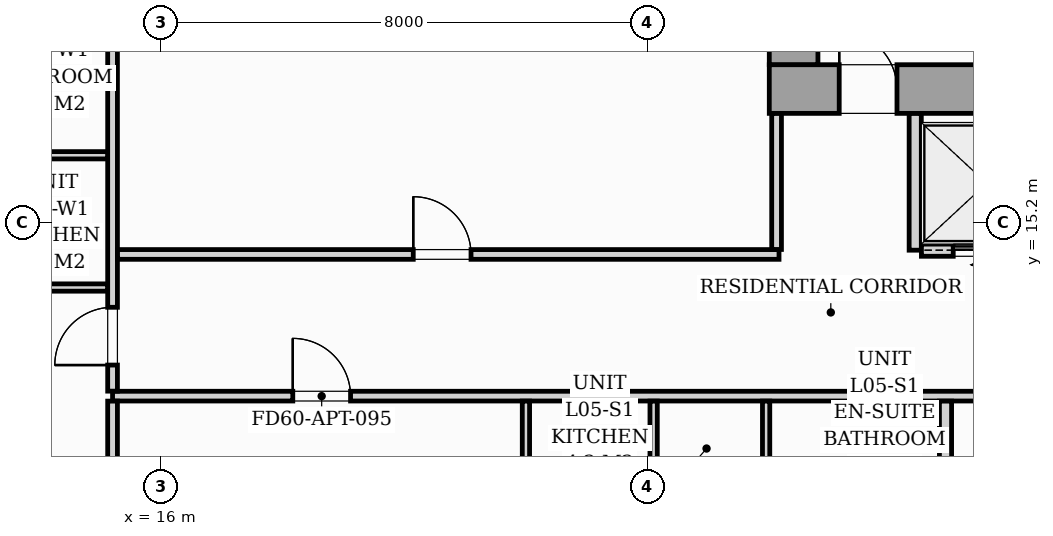
"""IFC4 building model, lengths in metres.
Left out: names, types, materials, properties, quantities, classifications, styles, units other than length and angle.
Written with IfcOpenShell. Run it as: python <this file> out.ifc"""

import sys

from ifc_helpers import new_model, si_unit, direction, frame, frame_2d, origin, origin_2d, place, context, subcontext, project, spatial, rectangle, i_section, extrude, source, transform, mapped, element, fill, save


model = new_model("IFC4")
c1 = context("Model", 3, precision=1e-05, world=origin(), true_north=direction((0.0, 1.0)))
c2 = subcontext(c1, "Body", "Model", "MODEL_VIEW")
j1 = project(units=[si_unit("LENGTHUNIT", "METRE"), si_unit("PLANEANGLEUNIT", "RADIAN")], contexts=[c1])
p1 = place(None, origin())
s1 = spatial("IfcSite", under=j1, at=p1, CompositionType="ELEMENT")
p2 = place(p1, origin())
s2 = spatial("IfcBuilding", under=s1, at=p2, CompositionType="ELEMENT")
p3 = place(p2, frame((0.0, 0.0, 23.0)))
s3 = spatial("IfcBuildingStorey", under=s2, at=p3, CompositionType="ELEMENT", Elevation=23.0)
m1 = source(origin(), c2, "Body", "SweptSolid", [
    extrude(i_section(OverallWidth=0.437, OverallDepth=0.514, WebThickness=0.061, FlangeThickness=0.097, FilletRadius=0.018, at=origin_2d()), origin(), (0.0, 0.0, 1.0), 3.196),
])
p4 = place(p3, frame((26.4, 17.4, 0.002), z_axis=(0.0, 0.0, 1.0), x_axis=(1.0, 0.0, 0.0)))
e1 = element("IfcColumn", 1, at=p4, inside=s3, PredefinedType="PILASTER", context=c2, shape_type="MappedRepresentation", body=[
    mapped(m1, transform((0.0, 0.0, 0.0), scale=1.0)),
])
p5 = place(p3, frame((26.0, 17.4, 0.0), z_axis=(0.0, 0.0, 1.0), x_axis=(1.0, 0.0, 0.0)))
e2 = element("IfcWall", 2, at=p5, inside=s3, PredefinedType="SHEAR", context=c2, shape_type="SweptSolid", body=[
    extrude(rectangle(XDim=20.0, YDim=0.8, at=frame_2d((10.0, 0.0))), origin(), (0.0, 0.0, 1.0), 3.2),
])
p6 = place(p5, frame((1.15, 0.0, 0.0)))
e3 = element("IfcOpeningElement", 3, at=p6, cuts=e2, PredefinedType="OPENING", context=c2, shape_type="SweptSolid", body=[
    extrude(rectangle(XDim=0.95, YDim=2.06, at=frame_2d((0.475, 1.03))), frame((0.0, 0.41, 0.0), z_axis=(0.0, -1.0, 0.0), x_axis=(1.0, 0.0, 0.0)), (0.0, 0.0, 1.0), 0.82),
])
p7 = place(p5, frame((9.58, 0.0, 0.0)))
e4 = element("IfcOpeningElement", 4, at=p7, cuts=e2, PredefinedType="OPENING", context=c2, shape_type="SweptSolid", body=[
    extrude(rectangle(XDim=0.85, YDim=2.0, at=frame_2d((0.425, 1.0))), frame((0.0, 0.41, 0.0), z_axis=(0.0, -1.0, 0.0), x_axis=(1.0, 0.0, 0.0)), (0.0, 0.0, 1.0), 0.82),
])
p8 = place(p5, frame((17.75, 0.0, 0.0)))
e5 = element("IfcOpeningElement", 5, at=p8, cuts=e2, PredefinedType="OPENING", context=c2, shape_type="SweptSolid", body=[
    extrude(rectangle(XDim=0.95, YDim=2.06, at=frame_2d((0.475, 1.03))), frame((0.0, 0.41, 0.0), z_axis=(0.0, -1.0, 0.0), x_axis=(1.0, 0.0, 0.0)), (0.0, 0.0, 1.0), 0.82),
])
p9 = place(p3, frame((26.4, 17.802, 0.0), z_axis=(0.0, 0.0, 1.0), x_axis=(0.0, 1.0, 0.0)))
e6 = element("IfcWall", 6, at=p9, inside=s3, PredefinedType="SHEAR", context=c2, shape_type="SweptSolid", body=[
    extrude(rectangle(XDim=5.796, YDim=0.8, at=frame_2d((2.898, 0.0))), origin(), (0.0, 0.0, 1.0), 3.2),
])
p10 = place(p3, frame((28.4, 14.75, 0.0), z_axis=(0.0, 0.0, 1.0), x_axis=(0.0, 1.0, 0.0)))
e7 = element("IfcWall", 7, at=p10, inside=s3, PredefinedType="PARTITIONING", context=c2, shape_type="SweptSolid", body=[
    extrude(rectangle(XDim=2.248, YDim=0.2, at=frame_2d((1.124, 0.0))), origin(), (0.0, 0.0, 1.0), 2.94),
])
p11 = place(p3, frame((28.502, 14.75, 0.0), z_axis=(0.0, 0.0, 1.0), x_axis=(1.0, 0.0, 0.0)))
e8 = element("IfcWall", 8, at=p11, inside=s3, PredefinedType="PARTITIONING", context=c2, shape_type="SweptSolid", body=[
    extrude(rectangle(XDim=2.146, YDim=0.2, at=frame_2d((1.073, 0.0))), origin(), (0.0, 0.0, 1.0), 2.94),
])
p12 = place(p11, frame((0.523, 0.0, 0.0)))
e9 = element("IfcOpeningElement", 9, at=p12, cuts=e8, PredefinedType="OPENING", context=c2, shape_type="SweptSolid", body=[
    extrude(rectangle(XDim=1.05, YDim=2.08, at=frame_2d((0.525, 1.04))), frame((0.0, 0.11, 0.0), z_axis=(0.0, -1.0, 0.0), x_axis=(1.0, 0.0, 0.0)), (0.0, 0.0, 1.0), 0.22),
])
p13 = place(p3, frame((15.2, 12.35, 0.0), z_axis=(0.0, 0.0, 1.0), x_axis=(1.0, 0.0, 0.0)))
e10 = element("IfcWall", 10, at=p13, inside=s3, PredefinedType="PARTITIONING", context=c2, shape_type="SweptSolid", body=[
    extrude(rectangle(XDim=37.1, YDim=0.16, at=frame_2d((18.55, 0.0))), origin(), (0.0, 0.0, 1.0), 2.94),
])
p14 = place(p13, frame((2.964, 0.0, 0.0)))
e11 = element("IfcOpeningElement", 11, at=p14, cuts=e10, PredefinedType="OPENING", context=c2, shape_type="SweptSolid", body=[
    extrude(rectangle(XDim=0.95, YDim=2.06, at=frame_2d((0.475, 1.03))), frame((0.0, 0.09, 0.0), z_axis=(0.0, -1.0, 0.0), x_axis=(1.0, 0.0, 0.0)), (0.0, 0.0, 1.0), 0.18),
])
p15 = place(p13, frame((28.202, 0.0, 0.0)))
e12 = element("IfcOpeningElement", 12, at=p15, cuts=e10, PredefinedType="OPENING", context=c2, shape_type="SweptSolid", body=[
    extrude(rectangle(XDim=0.95, YDim=2.06, at=frame_2d((0.475, 1.03))), frame((0.0, 0.09, 0.0), z_axis=(0.0, -1.0, 0.0), x_axis=(1.0, 0.0, 0.0)), (0.0, 0.0, 1.0), 0.18),
])
p16 = place(p3, frame((15.2, 2.962, 0.0), z_axis=(0.0, 0.0, 1.0), x_axis=(0.0, 1.0, 0.0)))
e13 = element("IfcWall", 13, at=p16, inside=s3, PredefinedType="PARTITIONING", context=c2, shape_type="SweptSolid", body=[
    extrude(rectangle(XDim=9.306, YDim=0.16, at=frame_2d((4.653, 0.0))), origin(), (0.0, 0.0, 1.0), 2.94),
])
p17 = place(p3, frame((15.2, 12.432, 0.0), z_axis=(0.0, 0.0, 1.0), x_axis=(0.0, 1.0, 0.0)))
e14 = element("IfcWall", 14, at=p17, inside=s3, PredefinedType="PARTITIONING", context=c2, shape_type="SweptSolid", body=[
    extrude(rectangle(XDim=15.006, YDim=0.16, at=frame_2d((7.503, 0.0))), origin(), (0.0, 0.0, 1.0), 2.94),
])
p18 = place(p17, frame((0.429, 0.0, 0.0)))
e15 = element("IfcOpeningElement", 15, at=p18, cuts=e14, PredefinedType="OPENING", context=c2, shape_type="SweptSolid", body=[
    extrude(rectangle(XDim=0.95, YDim=2.06, at=frame_2d((0.475, 1.03))), frame((0.0, 0.09, 0.0), z_axis=(0.0, -1.0, 0.0), x_axis=(1.0, 0.0, 0.0)), (0.0, 0.0, 1.0), 0.18),
])
p19 = place(p3, frame((25.948, 2.78, 0.0), z_axis=(0.0, 0.0, 1.0), x_axis=(0.0, 1.0, 0.0)))
e16 = element("IfcWall", 16, at=p19, inside=s3, PredefinedType="PARTITIONING", context=c2, shape_type="SweptSolid", body=[
    extrude(rectangle(XDim=9.488, YDim=0.12, at=frame_2d((4.744, 0.0))), origin(), (0.0, 0.0, 1.0), 2.94),
])
p20 = place(p19, frame((6.22, 0.0, 0.0)))
e17 = element("IfcOpeningElement", 17, at=p20, cuts=e16, PredefinedType="OPENING", context=c2, shape_type="SweptSolid", body=[
    extrude(rectangle(XDim=0.9, YDim=2.05, at=frame_2d((0.45, 1.025))), frame((0.0, 0.07, 0.0), z_axis=(0.0, -1.0, 0.0), x_axis=(1.0, 0.0, 0.0)), (0.0, 0.0, 1.0), 0.14),
])
for number, where, z_axis, x_axis in (
    (18, (24.098, 10.162, 0.0), (0.0, 0.0, 1.0), (0.0, 1.0, 0.0)),
    (19, (21.998, 10.162, 0.0), (0.0, 0.0, 1.0), (0.0, 1.0, 0.0)),
):
    element("IfcWall", number, at=place(p3, frame(where, z_axis=z_axis, x_axis=x_axis)), inside=s3, PredefinedType="PARTITIONING", context=c2, shape_type="SweptSolid", body=[
        extrude(rectangle(XDim=2.106, YDim=0.12, at=frame_2d((1.053, 0.0))), origin(), (0.0, 0.0, 1.0), 2.94),
    ])
p21 = place(p3, frame((28.898, 10.112, 0.0), z_axis=(0.0, 0.0, 1.0), x_axis=(0.0, 1.0, 0.0)))
e20 = element("IfcWall", 20, at=p21, inside=s3, PredefinedType="PARTITIONING", context=c2, shape_type="SweptSolid", body=[
    extrude(rectangle(XDim=2.156, YDim=0.2, at=frame_2d((1.078, 0.0))), origin(), (0.0, 0.0, 1.0), 2.94),
])
p22 = place(p3, frame((12.862, 16.311, 0.0), z_axis=(0.0, 0.0, 1.0), x_axis=(1.0, 0.0, 0.0)))
e21 = element("IfcWall", 21, at=p22, inside=s3, PredefinedType="PARTITIONING", context=c2, shape_type="SweptSolid", body=[
    extrude(rectangle(XDim=2.256, YDim=0.12, at=frame_2d((1.128, 0.0))), origin(), (0.0, 0.0, 1.0), 2.045),
])
p23 = place(p3, frame((12.862, 14.136, 0.0), z_axis=(0.0, 0.0, 1.0), x_axis=(1.0, 0.0, 0.0)))
e22 = element("IfcWall", 22, at=p23, inside=s3, PredefinedType="PARTITIONING", context=c2, shape_type="SweptSolid", body=[
    extrude(rectangle(XDim=2.256, YDim=0.12, at=frame_2d((1.128, 0.0))), origin(), (0.0, 0.0, 1.0), 2.94),
])
p24 = place(p3, frame((15.282, 14.68, 0.0), z_axis=(0.0, 0.0, 1.0), x_axis=(1.0, 0.0, 0.0)))
e23 = element("IfcWall", 23, at=p24, inside=s3, PredefinedType="PARTITIONING", context=c2, shape_type="SweptSolid", body=[
    extrude(rectangle(XDim=10.878, YDim=0.16, at=frame_2d((5.439, 0.0))), origin(), (0.0, 0.0, 1.0), 2.94),
])
p25 = place(p24, frame((4.863, 0.0, 0.0)))
e24 = element("IfcOpeningElement", 24, at=p25, cuts=e23, PredefinedType="OPENING", context=c2, shape_type="SweptSolid", body=[
    extrude(rectangle(XDim=0.95, YDim=2.06, at=frame_2d((0.475, 1.03))), frame((0.0, 0.09, 0.0), z_axis=(0.0, -1.0, 0.0), x_axis=(1.0, 0.0, 0.0)), (0.0, 0.0, 1.0), 0.18),
])
p26 = place(p3, frame((26.12, 14.762, 0.0), z_axis=(0.0, 0.0, 1.0), x_axis=(0.0, 1.0, 0.0)))
e25 = element("IfcWall", 25, at=p26, inside=s3, PredefinedType="PARTITIONING", context=c2, shape_type="SweptSolid", body=[
    extrude(rectangle(XDim=2.236, YDim=0.16, at=frame_2d((1.118, 0.0))), origin(), (0.0, 0.0, 1.0), 2.94),
])
m2 = source(origin(), c2, "Body", "SweptSolid", [
    extrude(rectangle(XDim=0.95, YDim=2.06, at=frame_2d((0.475, 1.03))), frame((0.0, 0.025, 0.0), z_axis=(0.0, -1.0, 0.0), x_axis=(1.0, 0.0, 0.0)), (0.0, 0.0, 1.0), 0.05),
])
p27 = place(p6, origin())
e26 = element("IfcDoor", 26, at=p27, inside=s3, OperationType="SINGLE_SWING_LEFT", PredefinedType="DOOR", context=c2, shape_type="MappedRepresentation", body=[
    mapped(m2, transform((0.0, 0.0, 0.0), scale=1.0)),
])
fill(e3, e26)
m3 = source(origin(), c2, "Body", "SweptSolid", [
    extrude(rectangle(XDim=1.05, YDim=2.08, at=frame_2d((0.525, 1.04))), frame((0.0, 0.025, 0.0), z_axis=(0.0, -1.0, 0.0), x_axis=(1.0, 0.0, 0.0)), (0.0, 0.0, 1.0), 0.05),
])
p28 = place(p12, origin())
e27 = element("IfcDoor", 27, at=p28, inside=s3, OperationType="SLIDING_TO_LEFT", PredefinedType="DOOR", context=c2, shape_type="MappedRepresentation", body=[
    mapped(m3, transform((0.0, 0.0, 0.0), scale=1.0)),
])
fill(e9, e27)
m4 = source(origin(), c2, "Body", "SweptSolid", [
    extrude(rectangle(XDim=0.95, YDim=2.06, at=frame_2d((0.475, 1.03))), frame((0.0, 0.025, 0.0), z_axis=(0.0, -1.0, 0.0), x_axis=(1.0, 0.0, 0.0)), (0.0, 0.0, 1.0), 0.05),
])
p29 = place(p14, origin())
e28 = element("IfcDoor", 28, at=p29, inside=s3, OperationType="SINGLE_SWING_LEFT", PredefinedType="DOOR", context=c2, shape_type="MappedRepresentation", body=[
    mapped(m4, transform((0.0, 0.0, 0.0), scale=1.0)),
])
fill(e11, e28)
p30 = place(p18, origin())
e29 = element("IfcDoor", 29, at=p30, inside=s3, OperationType="SINGLE_SWING_LEFT", PredefinedType="DOOR", context=c2, shape_type="MappedRepresentation", body=[
    mapped(m4, transform((0.0, 0.0, 0.0), scale=1.0)),
])
fill(e15, e29)
p31 = place(p25, origin())
e30 = element("IfcDoor", 30, at=p31, inside=s3, OperationType="SINGLE_SWING_LEFT", PredefinedType="DOOR", context=c2, shape_type="MappedRepresentation", body=[
    mapped(m4, transform((0.0, 0.0, 0.0), scale=1.0)),
])
fill(e24, e30)
save(model, sys.argv[1])
